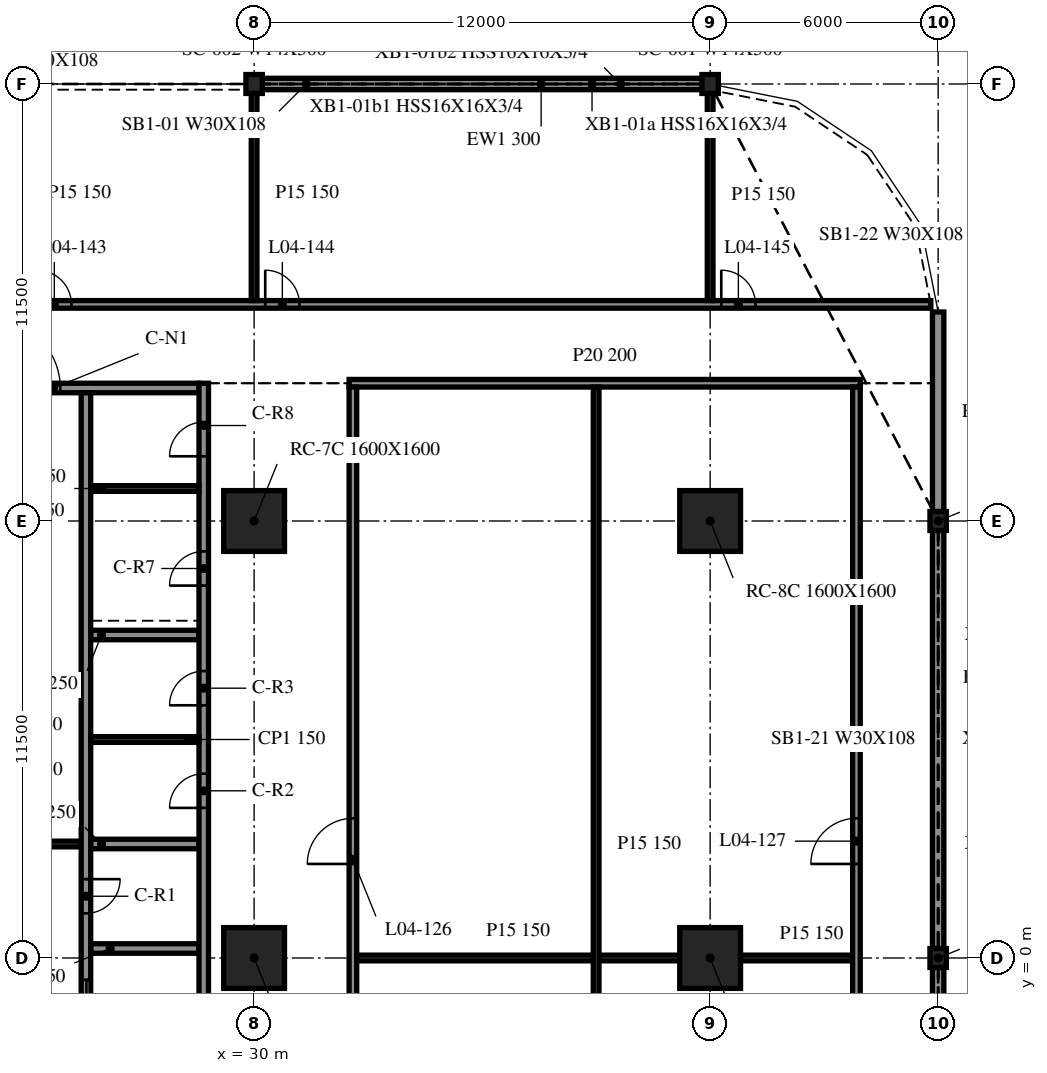
"""IFC4 building model, lengths in metres.
Left out: names, types, materials, properties, quantities, classifications, styles, units other than length and angle.
Written with IfcOpenShell. Run it as: python <this file> out.ifc"""

import sys

from ifc_helpers import new_model, si_unit, direction, frame, frame_2d, origin, origin_2d, place, context, subcontext, project, spatial, rectangle, i_section, extrude, element, fill, save


model = new_model("IFC4")
c1 = context("Model", 3, precision=1e-05, world=origin(), true_north=direction((0.0, 1.0)))
c2 = subcontext(c1, "Body", "Model", "MODEL_VIEW")
j1 = project(units=[si_unit("LENGTHUNIT", "METRE"), si_unit("PLANEANGLEUNIT", "RADIAN")], contexts=[c1])
p1 = place(None, origin())
s1 = spatial("IfcSite", under=j1, at=p1, CompositionType="ELEMENT")
p2 = place(p1, origin())
s2 = spatial("IfcBuilding", under=s1, at=p2, CompositionType="ELEMENT")
p3 = place(p2, frame((0.0, 0.0, 20.1)))
s3 = spatial("IfcBuildingStorey", under=s2, at=p3, CompositionType="ELEMENT", Elevation=20.1)
for number, where, z_axis, x_axis in (
    (1, (30.0, 0.0, -0.34), (0.0, 0.0, 1.0), (1.0, 0.0, 0.0)),
    (2, (30.0, 11.5, -0.34), (0.0, 0.0, 1.0), (1.0, 0.0, 0.0)),
    (3, (42.0, 0.0, -0.34), (0.0, 0.0, 1.0), (1.0, 0.0, 0.0)),
    (4, (42.0, 11.5, -0.34), (0.0, 0.0, 1.0), (1.0, 0.0, 0.0)),
):
    element("IfcColumn", number, at=place(p3, frame(where, z_axis=z_axis, x_axis=x_axis)), inside=s3, PredefinedType="COLUMN", context=c2, shape_type="SweptSolid", body=[
        extrude(rectangle(XDim=1.6, YDim=1.6, at=origin_2d()), origin(), (0.0, 0.0, 1.0), 4.3),
    ])
for number, where, z_axis, x_axis in (
    (5, (42.0, 23.0, -0.34), (0.0, 0.0, 1.0), (1.0, 0.0, 0.0)),
    (6, (30.0, 23.0, -0.34), (0.0, 0.0, 1.0), (1.0, 0.0, 0.0)),
    (7, (48.0, 0.0, -0.34), (0.0, 0.0, 1.0), (1.0, 0.0, 0.0)),
    (8, (48.0, 11.5, -0.34), (0.0, 0.0, 1.0), (1.0, 0.0, 0.0)),
):
    element("IfcColumn", number, at=place(p3, frame(where, z_axis=z_axis, x_axis=x_axis)), inside=s3, PredefinedType="COLUMN", context=c2, shape_type="SweptSolid", body=[
        extrude(i_section(OverallWidth=0.432, OverallDepth=0.498, WebThickness=0.056, FlangeThickness=0.089, at=origin_2d()), origin(), (0.0, 0.0, 1.0), 4.3),
    ])
p4 = place(p3, frame((41.972, 23.0, 0.0), z_axis=(0.0, 0.0, 1.0), x_axis=(-1.0, 0.0, 0.0)))
e9 = element("IfcWall", 9, at=p4, inside=s3, PredefinedType="NOTDEFINED", context=c2, shape_type="SweptSolid", body=[
    extrude(rectangle(XDim=11.944, YDim=0.3, at=frame_2d((5.972, 0.0))), origin(), (0.0, 0.0, 1.0), 3.203),
])
for number, where, z_axis, x_axis in (
    (10, (48.0, -11.251, 0.0), (0.0, 0.0, 1.0), (0.0, 1.0, 0.0)),
    (11, (48.0, 0.249, 0.0), (0.0, 0.0, 1.0), (0.0, 1.0, 0.0)),
):
    element("IfcWall", number, at=place(p3, frame(where, z_axis=z_axis, x_axis=x_axis)), inside=s3, PredefinedType="NOTDEFINED", context=c2, shape_type="SweptSolid", body=[
        extrude(rectangle(XDim=11.002, YDim=0.3, at=frame_2d((5.501, 0.0))), origin(), (0.0, 0.0, 1.0), 3.203),
    ])
p5 = place(p3, frame((48.0, 11.749, 0.0), z_axis=(0.0, 0.0, 1.0), x_axis=(0.0, 1.0, 0.0)))
e12 = element("IfcWall", 12, at=p5, inside=s3, PredefinedType="NOTDEFINED", context=c2, shape_type="SweptSolid", body=[
    extrude(rectangle(XDim=5.251, YDim=0.3, at=frame_2d((2.625, 0.0))), origin(), (0.0, 0.0, 1.0), 3.203),
])
p6 = place(p3, frame((28.675, -9.125, 0.0), z_axis=(0.0, 0.0, 1.0), x_axis=(0.0, 1.0, 0.0)))
e13 = element("IfcWall", 13, at=p6, inside=s3, PredefinedType="SOLIDWALL", context=c2, shape_type="SweptSolid", body=[
    extrude(rectangle(XDim=24.25, YDim=0.25, at=frame_2d((12.125, 0.0))), origin(), (0.0, 0.0, 1.0), 3.96),
])
p7 = place(p6, frame((13.075, 0.0, 0.0)))
e14 = element("IfcOpeningElement", 14, at=p7, cuts=e13, PredefinedType="OPENING", context=c2, shape_type="SweptSolid", body=[
    extrude(rectangle(XDim=0.9, YDim=2.1, at=frame_2d((0.45, 1.05))), frame((0.0, 0.135, 0.0), z_axis=(0.0, -1.0, 0.0), x_axis=(1.0, 0.0, 0.0)), (0.0, 0.0, 1.0), 0.27),
])
p8 = place(p6, frame((15.775, 0.0, 0.0)))
e15 = element("IfcOpeningElement", 15, at=p8, cuts=e13, PredefinedType="OPENING", context=c2, shape_type="SweptSolid", body=[
    extrude(rectangle(XDim=0.9, YDim=2.1, at=frame_2d((0.45, 1.05))), frame((0.0, 0.135, 0.0), z_axis=(0.0, -1.0, 0.0), x_axis=(1.0, 0.0, 0.0)), (0.0, 0.0, 1.0), 0.27),
])
p9 = place(p6, frame((18.925, 0.0, 0.0)))
e16 = element("IfcOpeningElement", 16, at=p9, cuts=e13, PredefinedType="OPENING", context=c2, shape_type="SweptSolid", body=[
    extrude(rectangle(XDim=0.9, YDim=2.1, at=frame_2d((0.45, 1.05))), frame((0.0, 0.135, 0.0), z_axis=(0.0, -1.0, 0.0), x_axis=(1.0, 0.0, 0.0)), (0.0, 0.0, 1.0), 0.27),
])
p10 = place(p6, frame((22.327, 0.0, 0.0)))
e17 = element("IfcOpeningElement", 17, at=p10, cuts=e13, PredefinedType="OPENING", context=c2, shape_type="SweptSolid", body=[
    extrude(rectangle(XDim=0.9, YDim=2.1, at=frame_2d((0.45, 1.05))), frame((0.0, 0.135, 0.0), z_axis=(0.0, -1.0, 0.0), x_axis=(1.0, 0.0, 0.0)), (0.0, 0.0, 1.0), 0.27),
])
p11 = place(p3, frame((19.45, 15.0, 0.0), z_axis=(0.0, 0.0, 1.0), x_axis=(1.0, 0.0, 0.0)))
e18 = element("IfcWall", 18, at=p11, inside=s3, PredefinedType="SOLIDWALL", context=c2, shape_type="SweptSolid", body=[
    extrude(rectangle(XDim=9.1, YDim=0.25, at=frame_2d((4.55, 0.0))), origin(), (0.0, 0.0, 1.0), 3.96),
])
p12 = place(p11, frame((3.65, 0.0, 0.0)))
e19 = element("IfcOpeningElement", 19, at=p12, cuts=e18, PredefinedType="OPENING", context=c2, shape_type="SweptSolid", body=[
    extrude(rectangle(XDim=1.8, YDim=2.1, at=frame_2d((0.9, 1.05))), frame((0.0, 0.135, 0.0), z_axis=(0.0, -1.0, 0.0), x_axis=(1.0, 0.0, 0.0)), (0.0, 0.0, 1.0), 0.27),
])
p13 = place(p3, frame((25.575, 14.875, 0.0), z_axis=(0.0, 0.0, 1.0), x_axis=(0.0, -1.0, 0.0)))
e20 = element("IfcWall", 20, at=p13, inside=s3, PredefinedType="SOLIDWALL", context=c2, shape_type="SweptSolid", body=[
    extrude(rectangle(XDim=17.5, YDim=0.25, at=frame_2d((8.75, 0.0))), origin(), (0.0, 0.0, 1.0), 3.96),
])
p14 = place(p13, frame((15.45, 0.0, 0.0)))
e21 = element("IfcOpeningElement", 21, at=p14, cuts=e20, PredefinedType="OPENING", context=c2, shape_type="SweptSolid", body=[
    extrude(rectangle(XDim=1.1, YDim=2.1, at=frame_2d((0.55, 1.05))), frame((0.0, 0.135, 0.0), z_axis=(0.0, -1.0, 0.0), x_axis=(1.0, 0.0, 0.0)), (0.0, 0.0, 1.0), 0.27),
])
p15 = place(p13, frame((12.8, 0.0, 0.0)))
e22 = element("IfcOpeningElement", 22, at=p15, cuts=e20, PredefinedType="OPENING", context=c2, shape_type="SweptSolid", body=[
    extrude(rectangle(XDim=0.9, YDim=2.1, at=frame_2d((0.45, 1.05))), frame((0.0, 0.135, 0.0), z_axis=(0.0, -1.0, 0.0), x_axis=(1.0, 0.0, 0.0)), (0.0, 0.0, 1.0), 0.27),
])
for number, where, z_axis, x_axis in (
    (23, (25.7, 0.25, 0.0), (0.0, 0.0, 1.0), (1.0, 0.0, 0.0)),
    (24, (25.7, 3.0, 0.0), (0.0, 0.0, 1.0), (1.0, 0.0, 0.0)),
    (25, (25.7, 8.5, 0.0), (0.0, 0.0, 1.0), (1.0, 0.0, 0.0)),
):
    element("IfcWall", number, at=place(p3, frame(where, z_axis=z_axis, x_axis=x_axis)), inside=s3, PredefinedType="SOLIDWALL", context=c2, shape_type="SweptSolid", body=[
        extrude(rectangle(XDim=2.85, YDim=0.25, at=frame_2d((1.425, 0.0))), origin(), (0.0, 0.0, 1.0), 3.96),
    ])
p16 = place(p3, frame((22.55, 3.0, 0.0), z_axis=(0.0, 0.0, 1.0), x_axis=(1.0, 0.0, 0.0)))
e26 = element("IfcWall", 26, at=p16, inside=s3, PredefinedType="PARTITIONING", context=c2, shape_type="SweptSolid", body=[
    extrude(rectangle(XDim=2.9, YDim=0.15, at=frame_2d((1.45, 0.0))), origin(), (0.0, 0.0, 1.0), 3.96),
])
for number, where, z_axis, x_axis in (
    (27, (25.7, 5.75, 0.0), (0.0, 0.0, 1.0), (1.0, 0.0, 0.0)),
    (28, (25.7, 12.355, 0.0), (0.0, 0.0, 1.0), (1.0, 0.0, 0.0)),
):
    element("IfcWall", number, at=place(p3, frame(where, z_axis=z_axis, x_axis=x_axis)), inside=s3, PredefinedType="PARTITIONING", context=c2, shape_type="SweptSolid", body=[
        extrude(rectangle(XDim=2.85, YDim=0.15, at=frame_2d((1.425, 0.0))), origin(), (0.0, 0.0, 1.0), 3.96),
    ])
p17 = place(p3, frame((32.7, 0.0, 0.0), z_axis=(0.0, 0.0, 1.0), x_axis=(1.0, 0.0, 0.0)))
e29 = element("IfcWall", 29, at=p17, inside=s3, PredefinedType="PARTITIONING", context=c2, shape_type="SweptSolid", body=[
    extrude(rectangle(XDim=8.5, YDim=0.15, at=frame_2d((4.25, 0.0))), origin(), (0.0, 0.0, 1.0), 3.96),
])
p18 = place(p3, frame((42.8, 0.0, 0.0), z_axis=(0.0, 0.0, 1.0), x_axis=(1.0, 0.0, 0.0)))
e30 = element("IfcWall", 30, at=p18, inside=s3, PredefinedType="PARTITIONING", context=c2, shape_type="SweptSolid", body=[
    extrude(rectangle(XDim=2.95, YDim=0.15, at=frame_2d((1.475, 0.0))), origin(), (0.0, 0.0, 1.0), 3.96),
])
p19 = place(p3, frame((32.5, 15.125, 0.0), z_axis=(0.0, 0.0, 1.0), x_axis=(1.0, 0.0, 0.0)))
e31 = element("IfcWall", 31, at=p19, inside=s3, PredefinedType="PARTITIONING", context=c2, shape_type="SweptSolid", body=[
    extrude(rectangle(XDim=13.45, YDim=0.2, at=frame_2d((6.725, 0.0))), origin(), (0.0, 0.0, 1.0), 3.96),
])
p20 = place(p3, frame((-47.807, 17.2, 0.0), z_axis=(0.0, 0.0, 1.0), x_axis=(1.0, 0.0, 0.0)))
e32 = element("IfcWall", 32, at=p20, inside=s3, PredefinedType="PARTITIONING", context=c2, shape_type="SweptSolid", body=[
    extrude(rectangle(XDim=95.615, YDim=0.2, at=frame_2d((47.807, 0.0))), origin(), (0.0, 0.0, 1.0), 3.96),
])
p21 = place(p20, frame((4.7, 0.0, 0.0)))
e33 = element("IfcOpeningElement", 33, at=p21, cuts=e32, PredefinedType="OPENING", context=c2, shape_type="SweptSolid", body=[
    extrude(rectangle(XDim=0.9, YDim=2.1, at=frame_2d((0.45, 1.05))), frame((0.0, 0.11, 0.0), z_axis=(0.0, -1.0, 0.0), x_axis=(1.0, 0.0, 0.0)), (0.0, 0.0, 1.0), 0.22),
])
p22 = place(p20, frame((16.7, 0.0, 0.0)))
e34 = element("IfcOpeningElement", 34, at=p22, cuts=e32, PredefinedType="OPENING", context=c2, shape_type="SweptSolid", body=[
    extrude(rectangle(XDim=0.9, YDim=2.1, at=frame_2d((0.45, 1.05))), frame((0.0, 0.11, 0.0), z_axis=(0.0, -1.0, 0.0), x_axis=(1.0, 0.0, 0.0)), (0.0, 0.0, 1.0), 0.22),
])
p23 = place(p20, frame((20.1, 0.0, 0.0)))
e35 = element("IfcOpeningElement", 35, at=p23, cuts=e32, PredefinedType="OPENING", context=c2, shape_type="SweptSolid", body=[
    extrude(rectangle(XDim=0.9, YDim=2.1, at=frame_2d((0.45, 1.05))), frame((0.0, 0.11, 0.0), z_axis=(0.0, -1.0, 0.0), x_axis=(1.0, 0.0, 0.0)), (0.0, 0.0, 1.0), 0.22),
])
p24 = place(p20, frame((22.7, 0.0, 0.0)))
e36 = element("IfcOpeningElement", 36, at=p24, cuts=e32, PredefinedType="OPENING", context=c2, shape_type="SweptSolid", body=[
    extrude(rectangle(XDim=0.9, YDim=2.1, at=frame_2d((0.45, 1.05))), frame((0.0, 0.11, 0.0), z_axis=(0.0, -1.0, 0.0), x_axis=(1.0, 0.0, 0.0)), (0.0, 0.0, 1.0), 0.22),
])
p25 = place(p20, frame((28.7, 0.0, 0.0)))
e37 = element("IfcOpeningElement", 37, at=p25, cuts=e32, PredefinedType="OPENING", context=c2, shape_type="SweptSolid", body=[
    extrude(rectangle(XDim=0.9, YDim=2.1, at=frame_2d((0.45, 1.05))), frame((0.0, 0.11, 0.0), z_axis=(0.0, -1.0, 0.0), x_axis=(1.0, 0.0, 0.0)), (0.0, 0.0, 1.0), 0.22),
])
p26 = place(p20, frame((40.7, 0.0, 0.0)))
e38 = element("IfcOpeningElement", 38, at=p26, cuts=e32, PredefinedType="OPENING", context=c2, shape_type="SweptSolid", body=[
    extrude(rectangle(XDim=0.9, YDim=2.1, at=frame_2d((0.45, 1.05))), frame((0.0, 0.11, 0.0), z_axis=(0.0, -1.0, 0.0), x_axis=(1.0, 0.0, 0.0)), (0.0, 0.0, 1.0), 0.22),
])
p27 = place(p20, frame((44.1, 0.0, 0.0)))
e39 = element("IfcOpeningElement", 39, at=p27, cuts=e32, PredefinedType="OPENING", context=c2, shape_type="SweptSolid", body=[
    extrude(rectangle(XDim=0.9, YDim=2.1, at=frame_2d((0.45, 1.05))), frame((0.0, 0.11, 0.0), z_axis=(0.0, -1.0, 0.0), x_axis=(1.0, 0.0, 0.0)), (0.0, 0.0, 1.0), 0.22),
])
p28 = place(p20, frame((46.7, 0.0, 0.0)))
e40 = element("IfcOpeningElement", 40, at=p28, cuts=e32, PredefinedType="OPENING", context=c2, shape_type="SweptSolid", body=[
    extrude(rectangle(XDim=0.9, YDim=2.1, at=frame_2d((0.45, 1.05))), frame((0.0, 0.11, 0.0), z_axis=(0.0, -1.0, 0.0), x_axis=(1.0, 0.0, 0.0)), (0.0, 0.0, 1.0), 0.22),
])
p29 = place(p20, frame((48.1, 0.0, 0.0)))
e41 = element("IfcOpeningElement", 41, at=p29, cuts=e32, PredefinedType="OPENING", context=c2, shape_type="SweptSolid", body=[
    extrude(rectangle(XDim=0.9, YDim=2.1, at=frame_2d((0.45, 1.05))), frame((0.0, 0.11, 0.0), z_axis=(0.0, -1.0, 0.0), x_axis=(1.0, 0.0, 0.0)), (0.0, 0.0, 1.0), 0.22),
])
p30 = place(p20, frame((54.1, 0.0, 0.0)))
e42 = element("IfcOpeningElement", 42, at=p30, cuts=e32, PredefinedType="OPENING", context=c2, shape_type="SweptSolid", body=[
    extrude(rectangle(XDim=0.9, YDim=2.1, at=frame_2d((0.45, 1.05))), frame((0.0, 0.11, 0.0), z_axis=(0.0, -1.0, 0.0), x_axis=(1.0, 0.0, 0.0)), (0.0, 0.0, 1.0), 0.22),
])
p31 = place(p20, frame((66.1, 0.0, 0.0)))
e43 = element("IfcOpeningElement", 43, at=p31, cuts=e32, PredefinedType="OPENING", context=c2, shape_type="SweptSolid", body=[
    extrude(rectangle(XDim=0.9, YDim=2.1, at=frame_2d((0.45, 1.05))), frame((0.0, 0.11, 0.0), z_axis=(0.0, -1.0, 0.0), x_axis=(1.0, 0.0, 0.0)), (0.0, 0.0, 1.0), 0.22),
])
p32 = place(p20, frame((69.5, 0.0, 0.0)))
e44 = element("IfcOpeningElement", 44, at=p32, cuts=e32, PredefinedType="OPENING", context=c2, shape_type="SweptSolid", body=[
    extrude(rectangle(XDim=0.9, YDim=2.1, at=frame_2d((0.45, 1.05))), frame((0.0, 0.11, 0.0), z_axis=(0.0, -1.0, 0.0), x_axis=(1.0, 0.0, 0.0)), (0.0, 0.0, 1.0), 0.22),
])
p33 = place(p20, frame((72.1, 0.0, 0.0)))
e45 = element("IfcOpeningElement", 45, at=p33, cuts=e32, PredefinedType="OPENING", context=c2, shape_type="SweptSolid", body=[
    extrude(rectangle(XDim=0.9, YDim=2.1, at=frame_2d((0.45, 1.05))), frame((0.0, 0.11, 0.0), z_axis=(0.0, -1.0, 0.0), x_axis=(1.0, 0.0, 0.0)), (0.0, 0.0, 1.0), 0.22),
])
p34 = place(p20, frame((78.1, 0.0, 0.0)))
e46 = element("IfcOpeningElement", 46, at=p34, cuts=e32, PredefinedType="OPENING", context=c2, shape_type="SweptSolid", body=[
    extrude(rectangle(XDim=0.9, YDim=2.1, at=frame_2d((0.45, 1.05))), frame((0.0, 0.11, 0.0), z_axis=(0.0, -1.0, 0.0), x_axis=(1.0, 0.0, 0.0)), (0.0, 0.0, 1.0), 0.22),
])
p35 = place(p20, frame((90.1, 0.0, 0.0)))
e47 = element("IfcOpeningElement", 47, at=p35, cuts=e32, PredefinedType="OPENING", context=c2, shape_type="SweptSolid", body=[
    extrude(rectangle(XDim=0.9, YDim=2.1, at=frame_2d((0.45, 1.05))), frame((0.0, 0.11, 0.0), z_axis=(0.0, -1.0, 0.0), x_axis=(1.0, 0.0, 0.0)), (0.0, 0.0, 1.0), 0.22),
])
p36 = place(p3, frame((30.0, 17.3, 0.0), z_axis=(0.0, 0.0, 1.0), x_axis=(0.0, 1.0, 0.0)))
e48 = element("IfcWall", 48, at=p36, inside=s3, PredefinedType="PARTITIONING", context=c2, shape_type="SweptSolid", body=[
    extrude(rectangle(XDim=5.675, YDim=0.15, at=frame_2d((2.837, 0.0))), origin(), (0.0, 0.0, 1.0), 3.96),
])
p37 = place(p3, frame((32.6, -9.025, 0.0), z_axis=(0.0, 0.0, 1.0), x_axis=(0.0, 1.0, 0.0)))
e49 = element("IfcWall", 49, at=p37, inside=s3, PredefinedType="PARTITIONING", context=c2, shape_type="SweptSolid", body=[
    extrude(rectangle(XDim=24.05, YDim=0.2, at=frame_2d((12.025, 0.0))), origin(), (0.0, 0.0, 1.0), 3.96),
])
p38 = place(p37, frame((11.5, 0.0, 0.0)))
e50 = element("IfcOpeningElement", 50, at=p38, cuts=e49, PredefinedType="OPENING", context=c2, shape_type="SweptSolid", body=[
    extrude(rectangle(XDim=1.2, YDim=2.1, at=frame_2d((0.6, 1.05))), frame((0.0, 0.11, 0.0), z_axis=(0.0, -1.0, 0.0), x_axis=(1.0, 0.0, 0.0)), (0.0, 0.0, 1.0), 0.22),
])
p39 = place(p3, frame((39.0, -9.025, 0.0), z_axis=(0.0, 0.0, 1.0), x_axis=(0.0, 1.0, 0.0)))
e51 = element("IfcWall", 51, at=p39, inside=s3, PredefinedType="PARTITIONING", context=c2, shape_type="SweptSolid", body=[
    extrude(rectangle(XDim=24.05, YDim=0.15, at=frame_2d((12.025, 0.0))), origin(), (0.0, 0.0, 1.0), 3.96),
])
p40 = place(p3, frame((42.0, 17.3, 0.0), z_axis=(0.0, 0.0, 1.0), x_axis=(0.0, 1.0, 0.0)))
e52 = element("IfcWall", 52, at=p40, inside=s3, PredefinedType="PARTITIONING", context=c2, shape_type="SweptSolid", body=[
    extrude(rectangle(XDim=5.547, YDim=0.15, at=frame_2d((2.773, 0.0))), origin(), (0.0, 0.0, 1.0), 3.96),
])
p41 = place(p3, frame((45.85, -9.025, 0.0), z_axis=(0.0, 0.0, 1.0), x_axis=(0.0, 1.0, 0.0)))
e53 = element("IfcWall", 53, at=p41, inside=s3, PredefinedType="PARTITIONING", context=c2, shape_type="SweptSolid", body=[
    extrude(rectangle(XDim=24.05, YDim=0.2, at=frame_2d((12.025, 0.0))), origin(), (0.0, 0.0, 1.0), 3.96),
])
p42 = place(p41, frame((11.5, 0.0, 0.0)))
e54 = element("IfcOpeningElement", 54, at=p42, cuts=e53, PredefinedType="OPENING", context=c2, shape_type="SweptSolid", body=[
    extrude(rectangle(XDim=1.2, YDim=2.1, at=frame_2d((0.6, 1.05))), frame((0.0, 0.11, 0.0), z_axis=(0.0, -1.0, 0.0), x_axis=(1.0, 0.0, 0.0)), (0.0, 0.0, 1.0), 0.22),
])
p43 = place(p12, origin())
e55 = element("IfcDoor", 55, at=p43, inside=s3, OperationType="DOUBLE_DOOR_SINGLE_SWING", PredefinedType="DOOR", context=c2, shape_type="SweptSolid", body=[
    extrude(rectangle(XDim=1.8, YDim=2.1, at=frame_2d((0.9, 1.05))), frame((0.0, 0.025, 0.0), z_axis=(0.0, -1.0, 0.0), x_axis=(1.0, 0.0, 0.0)), (0.0, 0.0, 1.0), 0.05),
])
fill(e19, e55)
p44 = place(p14, origin())
e56 = element("IfcDoor", 56, at=p44, inside=s3, OperationType="DOUBLE_DOOR_SLIDING", PredefinedType="DOOR", context=c2, shape_type="SweptSolid", body=[
    extrude(rectangle(XDim=1.1, YDim=2.1, at=frame_2d((0.55, 1.05))), frame((0.0, 0.025, 0.0), z_axis=(0.0, -1.0, 0.0), x_axis=(1.0, 0.0, 0.0)), (0.0, 0.0, 1.0), 0.05),
])
fill(e21, e56)
p45 = place(p15, origin())
e57 = element("IfcDoor", 57, at=p45, inside=s3, OperationType="SINGLE_SWING_LEFT", PredefinedType="DOOR", context=c2, shape_type="SweptSolid", body=[
    extrude(rectangle(XDim=0.9, YDim=2.1, at=frame_2d((0.45, 1.05))), frame((0.0, 0.025, 0.0), z_axis=(0.0, -1.0, 0.0), x_axis=(1.0, 0.0, 0.0)), (0.0, 0.0, 1.0), 0.05),
])
fill(e22, e57)
p46 = place(p7, origin())
e58 = element("IfcDoor", 58, at=p46, inside=s3, OperationType="SINGLE_SWING_RIGHT", PredefinedType="DOOR", context=c2, shape_type="SweptSolid", body=[
    extrude(rectangle(XDim=0.9, YDim=2.1, at=frame_2d((0.45, 1.05))), frame((0.0, 0.025, 0.0), z_axis=(0.0, -1.0, 0.0), x_axis=(1.0, 0.0, 0.0)), (0.0, 0.0, 1.0), 0.05),
])
fill(e14, e58)
p47 = place(p8, origin())
e59 = element("IfcDoor", 59, at=p47, inside=s3, OperationType="SINGLE_SWING_LEFT", PredefinedType="DOOR", context=c2, shape_type="SweptSolid", body=[
    extrude(rectangle(XDim=0.9, YDim=2.1, at=frame_2d((0.45, 1.05))), frame((0.0, 0.025, 0.0), z_axis=(0.0, -1.0, 0.0), x_axis=(1.0, 0.0, 0.0)), (0.0, 0.0, 1.0), 0.05),
])
fill(e15, e59)
p48 = place(p9, origin())
e60 = element("IfcDoor", 60, at=p48, inside=s3, OperationType="SINGLE_SWING_LEFT", PredefinedType="DOOR", context=c2, shape_type="SweptSolid", body=[
    extrude(rectangle(XDim=0.9, YDim=2.1, at=frame_2d((0.45, 1.05))), frame((0.0, 0.025, 0.0), z_axis=(0.0, -1.0, 0.0), x_axis=(1.0, 0.0, 0.0)), (0.0, 0.0, 1.0), 0.05),
])
fill(e16, e60)
p49 = place(p10, origin())
e61 = element("IfcDoor", 61, at=p49, inside=s3, OperationType="SINGLE_SWING_RIGHT", PredefinedType="DOOR", context=c2, shape_type="SweptSolid", body=[
    extrude(rectangle(XDim=0.9, YDim=2.1, at=frame_2d((0.45, 1.05))), frame((0.0, 0.025, 0.0), z_axis=(0.0, -1.0, 0.0), x_axis=(1.0, 0.0, 0.0)), (0.0, 0.0, 1.0), 0.05),
])
fill(e17, e61)
p50 = place(p38, origin())
e62 = element("IfcDoor", 62, at=p50, inside=s3, OperationType="SINGLE_SWING_LEFT", PredefinedType="DOOR", context=c2, shape_type="SweptSolid", body=[
    extrude(rectangle(XDim=1.2, YDim=2.1, at=frame_2d((0.6, 1.05))), frame((0.0, 0.025, 0.0), z_axis=(0.0, -1.0, 0.0), x_axis=(1.0, 0.0, 0.0)), (0.0, 0.0, 1.0), 0.05),
])
fill(e50, e62)
p51 = place(p42, origin())
e63 = element("IfcDoor", 63, at=p51, inside=s3, OperationType="SINGLE_SWING_RIGHT", PredefinedType="DOOR", context=c2, shape_type="SweptSolid", body=[
    extrude(rectangle(XDim=1.2, YDim=2.1, at=frame_2d((0.6, 1.05))), frame((0.0, 0.025, 0.0), z_axis=(0.0, -1.0, 0.0), x_axis=(1.0, 0.0, 0.0)), (0.0, 0.0, 1.0), 0.05),
])
fill(e54, e63)
p52 = place(p33, origin())
e64 = element("IfcDoor", 64, at=p52, inside=s3, OperationType="SINGLE_SWING_RIGHT", PredefinedType="DOOR", context=c2, shape_type="SweptSolid", body=[
    extrude(rectangle(XDim=0.9, YDim=2.1, at=frame_2d((0.45, 1.05))), frame((0.0, 0.025, 0.0), z_axis=(0.0, -1.0, 0.0), x_axis=(1.0, 0.0, 0.0)), (0.0, 0.0, 1.0), 0.05),
])
fill(e45, e64)
p53 = place(p34, origin())
e65 = element("IfcDoor", 65, at=p53, inside=s3, OperationType="SINGLE_SWING_RIGHT", PredefinedType="DOOR", context=c2, shape_type="SweptSolid", body=[
    extrude(rectangle(XDim=0.9, YDim=2.1, at=frame_2d((0.45, 1.05))), frame((0.0, 0.025, 0.0), z_axis=(0.0, -1.0, 0.0), x_axis=(1.0, 0.0, 0.0)), (0.0, 0.0, 1.0), 0.05),
])
fill(e46, e65)
p54 = place(p35, origin())
e66 = element("IfcDoor", 66, at=p54, inside=s3, OperationType="SINGLE_SWING_RIGHT", PredefinedType="DOOR", context=c2, shape_type="SweptSolid", body=[
    extrude(rectangle(XDim=0.9, YDim=2.1, at=frame_2d((0.45, 1.05))), frame((0.0, 0.025, 0.0), z_axis=(0.0, -1.0, 0.0), x_axis=(1.0, 0.0, 0.0)), (0.0, 0.0, 1.0), 0.05),
])
fill(e47, e66)
save(model, sys.argv[1])
